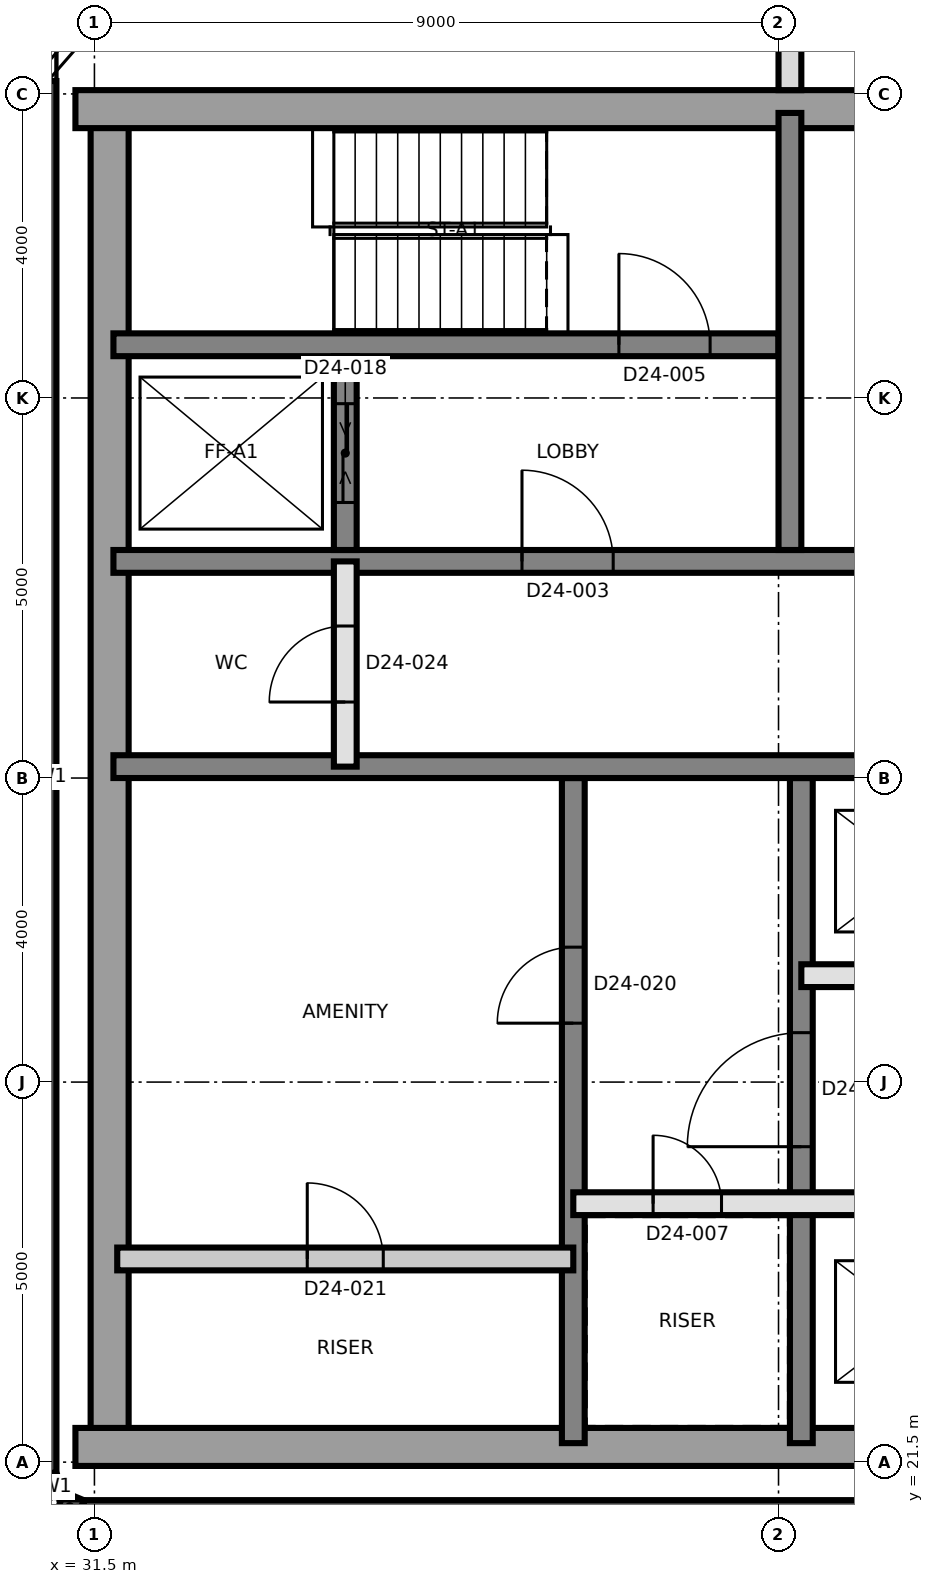
"""IFC4 building model, lengths in metres.
Left out: names, types, materials, properties, quantities, classifications, styles, units other than length and angle.
Written with IfcOpenShell. Run it as: python <this file> out.ifc"""

import sys

from ifc_helpers import new_model, si_unit, direction, frame, frame_2d, origin, place, context, subcontext, project, spatial, rectangle, extrude, element, fill, save


model = new_model("IFC4")
c1 = context("Model", 3, precision=1e-05, world=origin(), true_north=direction((0.0, 1.0)))
c2 = subcontext(c1, "Body", "Model", "MODEL_VIEW")
j1 = project(units=[si_unit("LENGTHUNIT", "METRE"), si_unit("PLANEANGLEUNIT", "RADIAN")], contexts=[c1])
p1 = place(None, origin())
s1 = spatial("IfcSite", under=j1, at=p1, CompositionType="ELEMENT")
p2 = place(p1, origin())
s2 = spatial("IfcBuilding", under=s1, at=p2, CompositionType="ELEMENT")
p3 = place(p2, frame((0.0, 0.0, 214.3)))
s3 = spatial("IfcBuildingStorey", under=s2, at=p3, CompositionType="ELEMENT", Elevation=214.3)
p4 = place(p3, frame((31.7, 21.75, 0.0), z_axis=(0.0, 0.0, 1.0), x_axis=(0.0, 1.0, 0.0)))
e1 = element("IfcWall", 1, at=p4, inside=s3, PredefinedType="SHEAR", context=c2, shape_type="SweptSolid", body=[
    extrude(rectangle(XDim=17.5, YDim=0.5, at=frame_2d((8.75, 0.0))), origin(), (0.0, 0.0, 1.0), 3.7),
])
p5 = place(p3, frame((31.25, 21.7, 0.0), z_axis=(0.0, 0.0, 1.0), x_axis=(1.0, 0.0, 0.0)))
e2 = element("IfcWall", 2, at=p5, inside=s3, PredefinedType="SHEAR", context=c2, shape_type="SweptSolid", body=[
    extrude(rectangle(XDim=27.0, YDim=0.5, at=frame_2d((13.5, 0.0))), origin(), (0.0, 0.0, 1.0), 3.7),
])
p6 = place(p3, frame((31.25, 39.3, 0.0), z_axis=(0.0, 0.0, 1.0), x_axis=(1.0, 0.0, 0.0)))
e3 = element("IfcWall", 3, at=p6, inside=s3, PredefinedType="SHEAR", context=c2, shape_type="SweptSolid", body=[
    extrude(rectangle(XDim=27.0, YDim=0.5, at=frame_2d((13.5, 0.0))), origin(), (0.0, 0.0, 1.0), 3.7),
])
p7 = place(p6, frame((10.45, 0.0, 0.0)))
e4 = element("IfcOpeningElement", 4, at=p7, cuts=e3, PredefinedType="OPENING", context=c2, shape_type="SweptSolid", body=[
    extrude(rectangle(XDim=1.2, YDim=2.1, at=frame_2d((0.6, 1.05))), frame((0.0, 0.26, 0.0), z_axis=(0.0, -1.0, 0.0), x_axis=(1.0, 0.0, 0.0)), (0.0, 0.0, 1.0), 0.52),
])
p8 = place(p3, frame((37.8, 21.75, 0.0), z_axis=(0.0, 0.0, 1.0), x_axis=(0.0, 1.0, 0.0)))
e5 = element("IfcWall", 5, at=p8, inside=s3, PredefinedType="SHEAR", context=c2, shape_type="SweptSolid", body=[
    extrude(rectangle(XDim=8.75, YDim=0.3, at=frame_2d((4.375, 0.0))), origin(), (0.0, 0.0, 1.0), 3.7),
])
p9 = place(p8, frame((5.525, 0.0, 0.0)))
e6 = element("IfcOpeningElement", 6, at=p9, cuts=e5, PredefinedType="OPENING", context=c2, shape_type="SweptSolid", body=[
    extrude(rectangle(XDim=1.0, YDim=2.1, at=frame_2d((0.5, 1.05))), frame((0.0, 0.16, 0.0), z_axis=(0.0, -1.0, 0.0), x_axis=(1.0, 0.0, 0.0)), (0.0, 0.0, 1.0), 0.32),
])
p10 = place(p3, frame((40.8, 21.75, 0.0), z_axis=(0.0, 0.0, 1.0), x_axis=(0.0, 1.0, 0.0)))
e7 = element("IfcWall", 7, at=p10, inside=s3, PredefinedType="SHEAR", context=c2, shape_type="SweptSolid", body=[
    extrude(rectangle(XDim=8.75, YDim=0.3, at=frame_2d((4.375, 0.0))), origin(), (0.0, 0.0, 1.0), 3.7),
])
p11 = place(p10, frame((3.9, 0.0, 0.0)))
e8 = element("IfcOpeningElement", 8, at=p11, cuts=e7, PredefinedType="OPENING", context=c2, shape_type="SweptSolid", body=[
    extrude(rectangle(XDim=1.5, YDim=2.1, at=frame_2d((0.75, 1.05))), frame((0.0, 0.16, 0.0), z_axis=(0.0, -1.0, 0.0), x_axis=(1.0, 0.0, 0.0)), (0.0, 0.0, 1.0), 0.32),
])
p12 = place(p3, frame((31.75, 30.65, 0.0), z_axis=(0.0, 0.0, 1.0), x_axis=(1.0, 0.0, 0.0)))
e9 = element("IfcWall", 9, at=p12, inside=s3, PredefinedType="SHEAR", context=c2, shape_type="SweptSolid", body=[
    extrude(rectangle(XDim=26.5, YDim=0.3, at=frame_2d((13.25, 0.0))), origin(), (0.0, 0.0, 1.0), 3.7),
])
p13 = place(p12, frame((24.75, 0.0, 0.0)))
e10 = element("IfcOpeningElement", 10, at=p13, cuts=e9, PredefinedType="OPENING", context=c2, shape_type="SweptSolid", body=[
    extrude(rectangle(XDim=1.0, YDim=2.1, at=frame_2d((0.5, 1.05))), frame((0.0, 0.16, 0.0), z_axis=(0.0, -1.0, 0.0), x_axis=(1.0, 0.0, 0.0)), (0.0, 0.0, 1.0), 0.32),
])
p14 = place(p3, frame((31.75, 33.35, 0.0), z_axis=(0.0, 0.0, 1.0), x_axis=(1.0, 0.0, 0.0)))
e11 = element("IfcWall", 11, at=p14, inside=s3, PredefinedType="SHEAR", context=c2, shape_type="SweptSolid", body=[
    extrude(rectangle(XDim=26.5, YDim=0.3, at=frame_2d((13.25, 0.0))), origin(), (0.0, 0.0, 1.0), 3.7),
])
p15 = place(p14, frame((13.9, 0.0, 0.0)))
e12 = element("IfcOpeningElement", 12, at=p15, cuts=e11, PredefinedType="OPENING", context=c2, shape_type="SweptSolid", body=[
    extrude(rectangle(XDim=1.4, YDim=2.1, at=frame_2d((0.7, 1.05))), frame((0.0, 0.16, 0.0), z_axis=(0.0, -1.0, 0.0), x_axis=(1.0, 0.0, 0.0)), (0.0, 0.0, 1.0), 0.32),
])
p16 = place(p14, frame((5.375, 0.0, 0.0)))
e13 = element("IfcOpeningElement", 13, at=p16, cuts=e11, PredefinedType="OPENING", context=c2, shape_type="SweptSolid", body=[
    extrude(rectangle(XDim=1.2, YDim=2.1, at=frame_2d((0.6, 1.05))), frame((0.0, 0.16, 0.0), z_axis=(0.0, -1.0, 0.0), x_axis=(1.0, 0.0, 0.0)), (0.0, 0.0, 1.0), 0.32),
])
p17 = place(p14, frame((19.925, 0.0, 0.0)))
e14 = element("IfcOpeningElement", 14, at=p17, cuts=e11, PredefinedType="OPENING", context=c2, shape_type="SweptSolid", body=[
    extrude(rectangle(XDim=1.2, YDim=2.1, at=frame_2d((0.6, 1.05))), frame((0.0, 0.16, 0.0), z_axis=(0.0, -1.0, 0.0), x_axis=(1.0, 0.0, 0.0)), (0.0, 0.0, 1.0), 0.32),
])
p18 = place(p3, frame((31.75, 36.2, 0.0), z_axis=(0.0, 0.0, 1.0), x_axis=(1.0, 0.0, 0.0)))
e15 = element("IfcWall", 15, at=p18, inside=s3, PredefinedType="SHEAR", context=c2, shape_type="SweptSolid", body=[
    extrude(rectangle(XDim=8.75, YDim=0.3, at=frame_2d((4.375, 0.0))), origin(), (0.0, 0.0, 1.0), 3.7),
])
p19 = place(p18, frame((6.65, 0.0, 0.0)))
e16 = element("IfcOpeningElement", 16, at=p19, cuts=e15, PredefinedType="OPENING", context=c2, shape_type="SweptSolid", body=[
    extrude(rectangle(XDim=1.2, YDim=2.1, at=frame_2d((0.6, 1.05))), frame((0.0, 0.16, 0.0), z_axis=(0.0, -1.0, 0.0), x_axis=(1.0, 0.0, 0.0)), (0.0, 0.0, 1.0), 0.32),
])
p20 = place(p3, frame((40.65, 33.5, 0.0), z_axis=(0.0, 0.0, 1.0), x_axis=(0.0, 1.0, 0.0)))
e17 = element("IfcWall", 17, at=p20, inside=s3, PredefinedType="SHEAR", context=c2, shape_type="SweptSolid", body=[
    extrude(rectangle(XDim=5.75, YDim=0.3, at=frame_2d((2.875, 0.0))), origin(), (0.0, 0.0, 1.0), 3.7),
])
p21 = place(p3, frame((34.8, 33.5, 0.0), z_axis=(0.0, 0.0, 1.0), x_axis=(0.0, 1.0, 0.0)))
e18 = element("IfcWall", 18, at=p21, inside=s3, PredefinedType="SHEAR", context=c2, shape_type="SweptSolid", body=[
    extrude(rectangle(XDim=2.55, YDim=0.3, at=frame_2d((1.275, 0.0))), origin(), (0.0, 0.0, 1.0), 3.7),
])
p22 = place(p21, frame((0.625, 0.0, 0.0)))
e19 = element("IfcOpeningElement", 19, at=p22, cuts=e18, PredefinedType="OPENING", context=c2, shape_type="SweptSolid", body=[
    extrude(rectangle(XDim=1.3, YDim=2.4, at=frame_2d((0.65, 1.2))), frame((0.0, 0.16, 0.0), z_axis=(0.0, -1.0, 0.0), x_axis=(1.0, 0.0, 0.0)), (0.0, 0.0, 1.0), 0.32),
])
p23 = place(p3, frame((30.85, 39.67, 0.0), z_axis=(0.0, 0.0, 1.0), x_axis=(0.0, -1.0, 0.0)))
e20 = element("IfcWall", 20, at=p23, inside=s3, PredefinedType="SOLIDWALL", context=c2, shape_type="SweptSolid", body=[
    extrude(rectangle(XDim=18.31, YDim=0.3, at=frame_2d((9.155, 0.0))), origin(), (0.0, 0.0, 1.0), 3.4),
])
for number, where, z_axis, x_axis in (
    (21, (30.861, 21.302, 0.0), (0.0, 0.0, 1.0), (0.383, -0.924, 0.0)),
    (22, (31.048, 20.967, 0.0), (0.0, 0.0, 1.0), (0.924, -0.383, 0.0)),
):
    element("IfcWall", number, at=place(p3, frame(where, z_axis=z_axis, x_axis=x_axis)), inside=s3, PredefinedType="SOLIDWALL", context=c2, shape_type="SweptSolid", body=[
        extrude(rectangle(XDim=0.275, YDim=0.3, at=frame_2d((0.138, 0.0))), origin(), (0.0, 0.0, 1.0), 3.4),
    ])
p24 = place(p3, frame((31.36, 20.85, 0.0), z_axis=(0.0, 0.0, 1.0), x_axis=(1.0, 0.0, 0.0)))
e23 = element("IfcWall", 23, at=p24, inside=s3, PredefinedType="SOLIDWALL", context=c2, shape_type="SweptSolid", body=[
    extrude(rectangle(XDim=27.281, YDim=0.3, at=frame_2d((13.64, 0.0))), origin(), (0.0, 0.0, 1.0), 3.4),
])
p25 = place(p3, frame((31.8, 24.173, 0.0), z_axis=(0.0, 0.0, 1.0), x_axis=(1.0, 0.0, 0.0)))
e24 = element("IfcWall", 24, at=p25, inside=s3, PredefinedType="PARTITIONING", context=c2, shape_type="SweptSolid", body=[
    extrude(rectangle(XDim=6.0, YDim=0.3, at=frame_2d((3.0, 0.0))), origin(), (0.0, 0.0, 1.0), 3.4),
])
p26 = place(p25, frame((2.5, 0.0, 0.0)))
e25 = element("IfcOpeningElement", 25, at=p26, cuts=e24, PredefinedType="OPENING", context=c2, shape_type="SweptSolid", body=[
    extrude(rectangle(XDim=1.0, YDim=2.1, at=frame_2d((0.5, 1.05))), frame((0.0, 0.16, 0.0), z_axis=(0.0, -1.0, 0.0), x_axis=(1.0, 0.0, 0.0)), (0.0, 0.0, 1.0), 0.32),
])
p27 = place(p3, frame((37.8, 24.9, 0.0), z_axis=(0.0, 0.0, 1.0), x_axis=(1.0, 0.0, 0.0)))
e26 = element("IfcWall", 26, at=p27, inside=s3, PredefinedType="SOLIDWALL", context=c2, shape_type="SweptSolid", body=[
    extrude(rectangle(XDim=12.0, YDim=0.3, at=frame_2d((6.0, 0.0))), origin(), (0.0, 0.0, 1.0), 3.4),
])
p28 = place(p27, frame((1.05, 0.0, 0.0)))
e27 = element("IfcOpeningElement", 27, at=p28, cuts=e26, PredefinedType="OPENING", context=c2, shape_type="SweptSolid", body=[
    extrude(rectangle(XDim=0.9, YDim=2.1, at=frame_2d((0.45, 1.05))), frame((0.0, 0.16, 0.0), z_axis=(0.0, -1.0, 0.0), x_axis=(1.0, 0.0, 0.0)), (0.0, 0.0, 1.0), 0.32),
])
p29 = place(p27, frame((10.05, 0.0, 0.0)))
e28 = element("IfcOpeningElement", 28, at=p29, cuts=e26, PredefinedType="OPENING", context=c2, shape_type="SweptSolid", body=[
    extrude(rectangle(XDim=0.9, YDim=2.1, at=frame_2d((0.45, 1.05))), frame((0.0, 0.16, 0.0), z_axis=(0.0, -1.0, 0.0), x_axis=(1.0, 0.0, 0.0)), (0.0, 0.0, 1.0), 0.32),
])
p30 = place(p27, frame((3.95, 0.0, 0.0)))
e29 = element("IfcOpeningElement", 29, at=p30, cuts=e26, PredefinedType="OPENING", context=c2, shape_type="SweptSolid", body=[
    extrude(rectangle(XDim=1.1, YDim=2.4, at=frame_2d((0.55, 1.2))), frame((0.0, 0.16, 0.0), z_axis=(0.0, -1.0, 0.0), x_axis=(1.0, 0.0, 0.0)), (0.0, 0.0, 1.0), 0.32),
])
p31 = place(p27, frame((6.95, 0.0, 0.0)))
e30 = element("IfcOpeningElement", 30, at=p31, cuts=e26, PredefinedType="OPENING", context=c2, shape_type="SweptSolid", body=[
    extrude(rectangle(XDim=1.1, YDim=2.4, at=frame_2d((0.55, 1.2))), frame((0.0, 0.16, 0.0), z_axis=(0.0, -1.0, 0.0), x_axis=(1.0, 0.0, 0.0)), (0.0, 0.0, 1.0), 0.32),
])
p32 = place(p3, frame((40.8, 27.9, 0.0), z_axis=(0.0, 0.0, 1.0), x_axis=(1.0, 0.0, 0.0)))
e31 = element("IfcWall", 31, at=p32, inside=s3, PredefinedType="SOLIDWALL", context=c2, shape_type="SweptSolid", body=[
    extrude(rectangle(XDim=6.0, YDim=0.3, at=frame_2d((3.0, 0.0))), origin(), (0.0, 0.0, 1.0), 3.4),
])
p33 = place(p32, frame((0.95, 0.0, 0.0)))
e32 = element("IfcOpeningElement", 32, at=p33, cuts=e31, PredefinedType="OPENING", context=c2, shape_type="SweptSolid", body=[
    extrude(rectangle(XDim=1.1, YDim=2.4, at=frame_2d((0.55, 1.2))), frame((0.0, 0.16, 0.0), z_axis=(0.0, -1.0, 0.0), x_axis=(1.0, 0.0, 0.0)), (0.0, 0.0, 1.0), 0.32),
])
p34 = place(p32, frame((3.95, 0.0, 0.0)))
e33 = element("IfcOpeningElement", 33, at=p34, cuts=e31, PredefinedType="OPENING", context=c2, shape_type="SweptSolid", body=[
    extrude(rectangle(XDim=1.1, YDim=2.4, at=frame_2d((0.55, 1.2))), frame((0.0, 0.16, 0.0), z_axis=(0.0, -1.0, 0.0), x_axis=(1.0, 0.0, 0.0)), (0.0, 0.0, 1.0), 0.32),
])
p35 = place(p3, frame((34.8, 30.65, 0.0), z_axis=(0.0, 0.0, 1.0), x_axis=(0.0, 1.0, 0.0)))
e34 = element("IfcWall", 34, at=p35, inside=s3, PredefinedType="SOLIDWALL", context=c2, shape_type="SweptSolid", body=[
    extrude(rectangle(XDim=2.7, YDim=0.3, at=frame_2d((1.35, 0.0))), origin(), (0.0, 0.0, 1.0), 3.4),
])
p36 = place(p35, frame((0.85, 0.0, 0.0)))
e35 = element("IfcOpeningElement", 35, at=p36, cuts=e34, PredefinedType="OPENING", context=c2, shape_type="SweptSolid", body=[
    extrude(rectangle(XDim=1.0, YDim=2.1, at=frame_2d((0.5, 1.05))), frame((0.0, 0.16, 0.0), z_axis=(0.0, -1.0, 0.0), x_axis=(1.0, 0.0, 0.0)), (0.0, 0.0, 1.0), 0.32),
])
p37 = place(p3, frame((40.65, 39.55, 0.0), z_axis=(0.0, 0.0, 1.0), x_axis=(0.0, 1.0, 0.0)))
e36 = element("IfcWall", 36, at=p37, inside=s3, PredefinedType="PARTITIONING", context=c2, shape_type="SweptSolid", body=[
    extrude(rectangle(XDim=17.92, YDim=0.3, at=frame_2d((8.96, 0.0))), origin(), (0.0, 0.0, 1.0), 3.4),
])
p38 = place(p37, frame((1.085, 0.0, 0.0)))
e37 = element("IfcOpeningElement", 37, at=p38, cuts=e36, PredefinedType="OPENING", context=c2, shape_type="SweptSolid", body=[
    extrude(rectangle(XDim=1.2, YDim=2.1, at=frame_2d((0.6, 1.05))), frame((0.0, 0.16, 0.0), z_axis=(0.0, -1.0, 0.0), x_axis=(1.0, 0.0, 0.0)), (0.0, 0.0, 1.0), 0.32),
])
p39 = place(p37, frame((4.335, 0.0, 0.0)))
e38 = element("IfcOpeningElement", 38, at=p39, cuts=e36, PredefinedType="OPENING", context=c2, shape_type="SweptSolid", body=[
    extrude(rectangle(XDim=1.0, YDim=2.1, at=frame_2d((0.5, 1.05))), frame((0.0, 0.16, 0.0), z_axis=(0.0, -1.0, 0.0), x_axis=(1.0, 0.0, 0.0)), (0.0, 0.0, 1.0), 0.32),
])
p40 = place(p37, frame((12.05, 0.0, 0.0)))
e39 = element("IfcOpeningElement", 39, at=p40, cuts=e36, PredefinedType="OPENING", context=c2, shape_type="SweptSolid", body=[
    extrude(rectangle(XDim=1.0, YDim=2.1, at=frame_2d((0.5, 1.05))), frame((0.0, 0.16, 0.0), z_axis=(0.0, -1.0, 0.0), x_axis=(1.0, 0.0, 0.0)), (0.0, 0.0, 1.0), 0.32),
])
p41 = place(p37, frame((16.45, 0.0, 0.0)))
e40 = element("IfcOpeningElement", 40, at=p41, cuts=e36, PredefinedType="OPENING", context=c2, shape_type="SweptSolid", body=[
    extrude(rectangle(XDim=1.0, YDim=2.1, at=frame_2d((0.5, 1.05))), frame((0.0, 0.16, 0.0), z_axis=(0.0, -1.0, 0.0), x_axis=(1.0, 0.0, 0.0)), (0.0, 0.0, 1.0), 0.32),
])
p42 = place(p11, origin())
e41 = element("IfcDoor", 41, at=p42, inside=s3, OperationType="SINGLE_SWING_RIGHT", PredefinedType="DOOR", context=c2, shape_type="SweptSolid", body=[
    extrude(rectangle(XDim=1.5, YDim=2.1, at=frame_2d((0.75, 1.05))), frame((0.0, 0.025, 0.0), z_axis=(0.0, -1.0, 0.0), x_axis=(1.0, 0.0, 0.0)), (0.0, 0.0, 1.0), 0.05),
])
fill(e8, e41)
p43 = place(p16, origin())
e42 = element("IfcDoor", 42, at=p43, inside=s3, OperationType="SINGLE_SWING_LEFT", PredefinedType="DOOR", context=c2, shape_type="SweptSolid", body=[
    extrude(rectangle(XDim=1.2, YDim=2.1, at=frame_2d((0.6, 1.05))), frame((0.0, 0.025, 0.0), z_axis=(0.0, -1.0, 0.0), x_axis=(1.0, 0.0, 0.0)), (0.0, 0.0, 1.0), 0.05),
])
fill(e13, e42)
p44 = place(p19, origin())
e43 = element("IfcDoor", 43, at=p44, inside=s3, OperationType="SINGLE_SWING_RIGHT", PredefinedType="DOOR", context=c2, shape_type="SweptSolid", body=[
    extrude(rectangle(XDim=1.2, YDim=2.1, at=frame_2d((0.6, 1.05))), frame((0.0, 0.025, 0.0), z_axis=(0.0, -1.0, 0.0), x_axis=(1.0, 0.0, 0.0)), (0.0, 0.0, 1.0), 0.05),
])
fill(e16, e43)
p45 = place(p28, origin())
e44 = element("IfcDoor", 44, at=p45, inside=s3, OperationType="SINGLE_SWING_LEFT", PredefinedType="DOOR", context=c2, shape_type="SweptSolid", body=[
    extrude(rectangle(XDim=0.9, YDim=2.1, at=frame_2d((0.45, 1.05))), frame((0.0, 0.025, 0.0), z_axis=(0.0, -1.0, 0.0), x_axis=(1.0, 0.0, 0.0)), (0.0, 0.0, 1.0), 0.05),
])
fill(e27, e44)
p46 = place(p22, origin())
e45 = element("IfcDoor", 45, at=p46, inside=s3, OperationType="SLIDING_TO_LEFT", PredefinedType="DOOR", context=c2, shape_type="SweptSolid", body=[
    extrude(rectangle(XDim=1.3, YDim=2.4, at=frame_2d((0.65, 1.2))), frame((0.0, 0.025, 0.0), z_axis=(0.0, -1.0, 0.0), x_axis=(1.0, 0.0, 0.0)), (0.0, 0.0, 1.0), 0.05),
])
fill(e19, e45)
p47 = place(p9, origin())
e46 = element("IfcDoor", 46, at=p47, inside=s3, OperationType="SINGLE_SWING_LEFT", PredefinedType="DOOR", context=c2, shape_type="SweptSolid", body=[
    extrude(rectangle(XDim=1.0, YDim=2.1, at=frame_2d((0.5, 1.05))), frame((0.0, 0.025, 0.0), z_axis=(0.0, -1.0, 0.0), x_axis=(1.0, 0.0, 0.0)), (0.0, 0.0, 1.0), 0.05),
])
fill(e6, e46)
p48 = place(p26, origin())
e47 = element("IfcDoor", 47, at=p48, inside=s3, OperationType="SINGLE_SWING_RIGHT", PredefinedType="DOOR", context=c2, shape_type="SweptSolid", body=[
    extrude(rectangle(XDim=1.0, YDim=2.1, at=frame_2d((0.5, 1.05))), frame((0.0, 0.025, 0.0), z_axis=(0.0, -1.0, 0.0), x_axis=(1.0, 0.0, 0.0)), (0.0, 0.0, 1.0), 0.05),
])
fill(e25, e47)
p49 = place(p36, origin())
e48 = element("IfcDoor", 48, at=p49, inside=s3, OperationType="SINGLE_SWING_LEFT", PredefinedType="DOOR", context=c2, shape_type="SweptSolid", body=[
    extrude(rectangle(XDim=1.0, YDim=2.1, at=frame_2d((0.5, 1.05))), frame((0.0, 0.025, 0.0), z_axis=(0.0, -1.0, 0.0), x_axis=(1.0, 0.0, 0.0)), (0.0, 0.0, 1.0), 0.05),
])
fill(e35, e48)
save(model, sys.argv[1])
